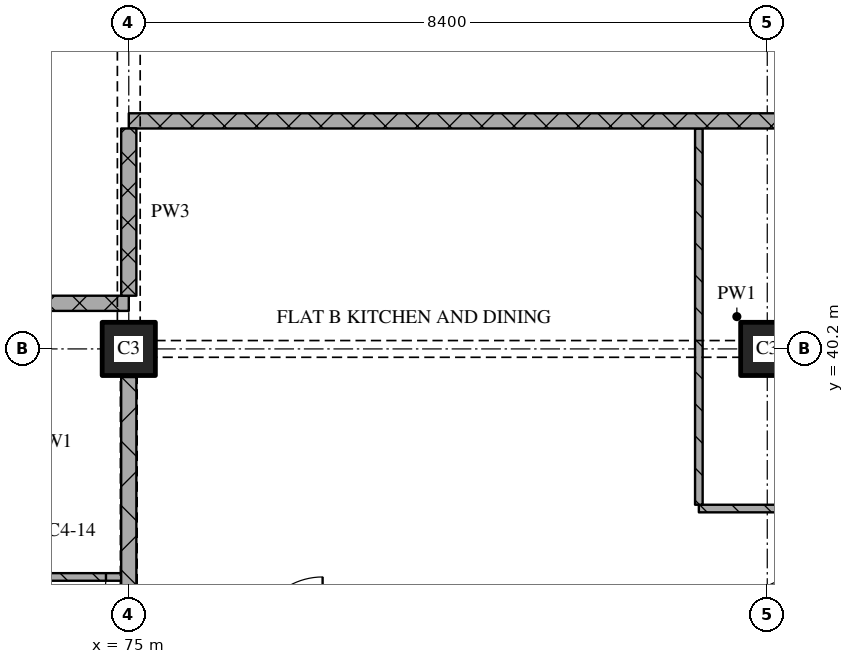
"""IFC4 building model, lengths in metres.
Left out: names, types, materials, properties, quantities, classifications, styles, units other than length and angle.
Written with IfcOpenShell. Run it as: python <this file> out.ifc"""

import sys

from ifc_helpers import new_model, si_unit, direction, frame, frame_2d, origin, origin_2d, place, context, subcontext, project, spatial, rectangle, extrude, element, fill, save


model = new_model("IFC4")
c1 = context("Model", 3, precision=1e-05, world=origin(), true_north=direction((0.0, 1.0)))
c2 = subcontext(c1, "Body", "Model", "MODEL_VIEW")
j1 = project(units=[si_unit("LENGTHUNIT", "METRE"), si_unit("PLANEANGLEUNIT", "RADIAN")], contexts=[c1])
p1 = place(None, origin())
s1 = spatial("IfcSite", under=j1, at=p1, CompositionType="ELEMENT")
p2 = place(p1, origin())
s2 = spatial("IfcBuilding", under=s1, at=p2, CompositionType="ELEMENT")
p3 = place(p2, frame((0.0, 0.0, 187.05)))
s3 = spatial("IfcBuildingStorey", under=s2, at=p3, CompositionType="ELEMENT", Elevation=187.05)
for number, where, z_axis, x_axis in (
    (1, (75.0, 40.2, 0.0), (0.0, 0.0, 1.0), (1.0, 0.0, 0.0)),
    (2, (83.4, 40.2, 0.0), (0.0, 0.0, 1.0), (1.0, 0.0, 0.0)),
):
    element("IfcColumn", number, at=place(p3, frame(where, z_axis=z_axis, x_axis=x_axis)), inside=s3, PredefinedType="COLUMN", context=c2, shape_type="SweptSolid", body=[
        extrude(rectangle(XDim=0.7, YDim=0.7, at=origin_2d()), origin(), (0.0, 0.0, 1.0), 3.6),
    ])
p4 = place(p3, frame((64.5, 37.2, 0.0), z_axis=(0.0, 0.0, 1.0), x_axis=(1.0, 0.0, 0.0)))
e3 = element("IfcWall", 3, at=p4, inside=s3, PredefinedType="PARTITIONING", context=c2, shape_type="SweptSolid", body=[
    extrude(rectangle(XDim=10.4, YDim=0.1, at=frame_2d((5.2, 0.0))), origin(), (0.0, 0.0, 1.0), 3.32),
])
p5 = place(p4, frame((6.35, 0.0, 0.0)))
e4 = element("IfcOpeningElement", 4, at=p5, cuts=e3, PredefinedType="OPENING", context=c2, shape_type="SweptSolid", body=[
    extrude(rectangle(XDim=0.8, YDim=2.1, at=frame_2d((0.4, 1.05))), frame((0.0, 0.06, 0.0), z_axis=(0.0, -1.0, 0.0), x_axis=(1.0, 0.0, 0.0)), (0.0, 0.0, 1.0), 0.12),
])
p6 = place(p4, frame((9.3, 0.0, 0.0)))
e5 = element("IfcOpeningElement", 5, at=p6, cuts=e3, PredefinedType="OPENING", context=c2, shape_type="SweptSolid", body=[
    extrude(rectangle(XDim=0.9, YDim=2.1, at=frame_2d((0.45, 1.05))), frame((0.0, 0.06, 0.0), z_axis=(0.0, -1.0, 0.0), x_axis=(1.0, 0.0, 0.0)), (0.0, 0.0, 1.0), 0.12),
])
p7 = place(p3, frame((82.5, 38.1, 0.0), z_axis=(0.0, 0.0, 1.0), x_axis=(1.0, 0.0, 0.0)))
e6 = element("IfcWall", 6, at=p7, inside=s3, PredefinedType="PARTITIONING", context=c2, shape_type="SweptSolid", body=[
    extrude(rectangle(XDim=5.7, YDim=0.1, at=frame_2d((2.85, 0.0))), origin(), (0.0, 0.0, 1.0), 3.32),
])
p8 = place(p3, frame((75.0, 40.8, 0.0), z_axis=(0.0, 0.0, 1.0), x_axis=(-1.0, 0.0, 0.0)))
e7 = element("IfcWall", 7, at=p8, inside=s3, PredefinedType="PARTITIONING", context=c2, shape_type="SweptSolid", body=[
    extrude(rectangle(XDim=24.28, YDim=0.2, at=frame_2d((12.14, 0.0))), origin(), (0.0, 0.0, 1.0), 3.32),
])
p9 = place(p8, frame((10.75, 0.0, 0.0)))
e8 = element("IfcOpeningElement", 8, at=p9, cuts=e7, PredefinedType="OPENING", context=c2, shape_type="SweptSolid", body=[
    extrude(rectangle(XDim=1.0, YDim=2.1, at=frame_2d((0.5, 1.05))), frame((0.0, 0.11, 0.0), z_axis=(0.0, -1.0, 0.0), x_axis=(1.0, 0.0, 0.0)), (0.0, 0.0, 1.0), 0.22),
])
p10 = place(p3, frame((100.2, 43.2, 0.0), z_axis=(0.0, 0.0, 1.0), x_axis=(-1.0, 0.0, 0.0)))
e9 = element("IfcWall", 9, at=p10, inside=s3, PredefinedType="PARTITIONING", context=c2, shape_type="SweptSolid", body=[
    extrude(rectangle(XDim=25.2, YDim=0.2, at=frame_2d((12.6, 0.0))), origin(), (0.0, 0.0, 1.0), 3.32),
])
p11 = place(p10, frame((10.75, 0.0, 0.0)))
e10 = element("IfcOpeningElement", 10, at=p11, cuts=e9, PredefinedType="OPENING", context=c2, shape_type="SweptSolid", body=[
    extrude(rectangle(XDim=1.0, YDim=2.1, at=frame_2d((0.5, 1.05))), frame((0.0, 0.11, 0.0), z_axis=(0.0, -1.0, 0.0), x_axis=(1.0, 0.0, 0.0)), (0.0, 0.0, 1.0), 0.22),
])
p12 = place(p3, frame((75.0, 43.1, 0.0), z_axis=(0.0, 0.0, 1.0), x_axis=(0.0, -1.0, 0.0)))
e11 = element("IfcWall", 11, at=p12, inside=s3, PredefinedType="PARTITIONING", context=c2, shape_type="SweptSolid", body=[
    extrude(rectangle(XDim=2.2, YDim=0.2, at=frame_2d((1.1, 0.0))), origin(), (0.0, 0.0, 1.0), 2.43),
])
p13 = place(p3, frame((75.0, 39.83, 0.0), z_axis=(0.0, 0.0, 1.0), x_axis=(0.0, -1.0, 0.0)))
e12 = element("IfcWall", 12, at=p13, inside=s3, PredefinedType="PARTITIONING", context=c2, shape_type="SweptSolid", body=[
    extrude(rectangle(XDim=7.66, YDim=0.2, at=frame_2d((3.83, 0.0))), origin(), (0.0, 0.0, 1.0), 2.72),
])
p14 = place(p3, frame((82.5, 43.1, 0.0), z_axis=(0.0, 0.0, 1.0), x_axis=(0.0, -1.0, 0.0)))
e13 = element("IfcWall", 13, at=p14, inside=s3, PredefinedType="PARTITIONING", context=c2, shape_type="SweptSolid", body=[
    extrude(rectangle(XDim=4.95, YDim=0.1, at=frame_2d((2.475, 0.0))), origin(), (0.0, 0.0, 1.0), 3.32),
])
p15 = place(p6, origin())
e14 = element("IfcDoor", 14, at=p15, inside=s3, OperationType="SINGLE_SWING_RIGHT", PredefinedType="DOOR", context=c2, shape_type="SweptSolid", body=[
    extrude(rectangle(XDim=0.9, YDim=2.1, at=frame_2d((0.45, 1.05))), frame((0.0, 0.025, 0.0), z_axis=(0.0, -1.0, 0.0), x_axis=(1.0, 0.0, 0.0)), (0.0, 0.0, 1.0), 0.05),
])
fill(e5, e14)
save(model, sys.argv[1])
